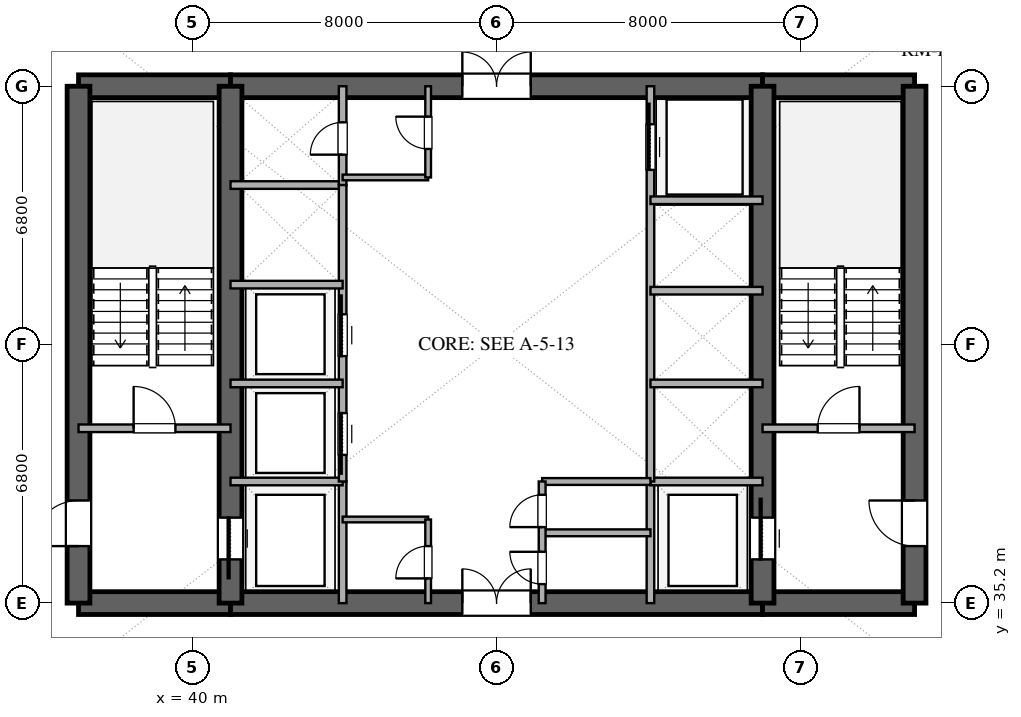
"""IFC4 building model, lengths in metres.
Left out: names, types, materials, properties, quantities, classifications, styles, units other than length and angle.
Written with IfcOpenShell. Run it as: python <this file> out.ifc"""

import sys

from ifc_helpers import new_model, si_unit, direction, frame, frame_2d, origin, place, context, subcontext, project, spatial, rectangle, extrude, element, fill, save


model = new_model("IFC4")
c1 = context("Model", 3, precision=1e-05, world=origin(), true_north=direction((0.0, 1.0)))
c2 = subcontext(c1, "Body", "Model", "MODEL_VIEW")
j1 = project(units=[si_unit("LENGTHUNIT", "METRE"), si_unit("PLANEANGLEUNIT", "RADIAN")], contexts=[c1])
p1 = place(None, origin())
s1 = spatial("IfcSite", under=j1, at=p1, CompositionType="ELEMENT")
p2 = place(p1, origin())
s2 = spatial("IfcBuilding", under=s1, at=p2, CompositionType="ELEMENT")
p3 = place(p2, frame((0.0, 0.0, 67.8)))
s3 = spatial("IfcBuildingStorey", under=s2, at=p3, CompositionType="ELEMENT", Elevation=67.8)
p4 = place(p3, frame((37.0, 35.2, 0.0), z_axis=(0.0, 0.0, 1.0), x_axis=(1.0, 0.0, 0.0)))
e1 = element("IfcWall", 1, at=p4, inside=s3, PredefinedType="SHEAR", context=c2, shape_type="SweptSolid", body=[
    extrude(rectangle(XDim=4.0, YDim=0.6, at=frame_2d((2.0, 0.0))), origin(), (0.0, 0.0, 1.0), 3.38),
])
p5 = place(p3, frame((41.0, 35.2, 0.0), z_axis=(0.0, 0.0, 1.0), x_axis=(1.0, 0.0, 0.0)))
e2 = element("IfcWall", 2, at=p5, inside=s3, PredefinedType="SHEAR", context=c2, shape_type="SweptSolid", body=[
    extrude(rectangle(XDim=14.0, YDim=0.6, at=frame_2d((7.0, 0.0))), origin(), (0.0, 0.0, 1.0), 3.38),
])
p6 = place(p5, frame((6.1, 0.0, 0.0)))
e3 = element("IfcOpeningElement", 3, at=p6, cuts=e2, PredefinedType="OPENING", context=c2, shape_type="SweptSolid", body=[
    extrude(rectangle(XDim=1.8, YDim=2.25, at=frame_2d((0.9, 1.125))), frame((0.0, 0.31, 0.0), z_axis=(0.0, -1.0, 0.0), x_axis=(1.0, 0.0, 0.0)), (0.0, 0.0, 1.0), 0.62),
])
for number, where, z_axis, x_axis in (
    (4, (55.0, 35.2, 0.0), (0.0, 0.0, 1.0), (1.0, 0.0, 0.0)),
    (5, (37.0, 48.8, 0.0), (0.0, 0.0, 1.0), (1.0, 0.0, 0.0)),
):
    element("IfcWall", number, at=place(p3, frame(where, z_axis=z_axis, x_axis=x_axis)), inside=s3, PredefinedType="SHEAR", context=c2, shape_type="SweptSolid", body=[
        extrude(rectangle(XDim=4.0, YDim=0.6, at=frame_2d((2.0, 0.0))), origin(), (0.0, 0.0, 1.0), 3.38),
    ])
p7 = place(p3, frame((41.0, 48.8, 0.0), z_axis=(0.0, 0.0, 1.0), x_axis=(1.0, 0.0, 0.0)))
e6 = element("IfcWall", 6, at=p7, inside=s3, PredefinedType="SHEAR", context=c2, shape_type="SweptSolid", body=[
    extrude(rectangle(XDim=14.0, YDim=0.6, at=frame_2d((7.0, 0.0))), origin(), (0.0, 0.0, 1.0), 3.38),
])
p8 = place(p7, frame((6.1, 0.0, 0.0)))
e7 = element("IfcOpeningElement", 7, at=p8, cuts=e6, PredefinedType="OPENING", context=c2, shape_type="SweptSolid", body=[
    extrude(rectangle(XDim=1.8, YDim=2.25, at=frame_2d((0.9, 1.125))), frame((0.0, 0.31, 0.0), z_axis=(0.0, -1.0, 0.0), x_axis=(1.0, 0.0, 0.0)), (0.0, 0.0, 1.0), 0.62),
])
p9 = place(p3, frame((55.0, 48.8, 0.0), z_axis=(0.0, 0.0, 1.0), x_axis=(1.0, 0.0, 0.0)))
e8 = element("IfcWall", 8, at=p9, inside=s3, PredefinedType="SHEAR", context=c2, shape_type="SweptSolid", body=[
    extrude(rectangle(XDim=4.0, YDim=0.6, at=frame_2d((2.0, 0.0))), origin(), (0.0, 0.0, 1.0), 3.38),
])
p10 = place(p3, frame((37.0, 35.2, 0.0), z_axis=(0.0, 0.0, 1.0), x_axis=(0.0, 1.0, 0.0)))
e9 = element("IfcWall", 9, at=p10, inside=s3, PredefinedType="SHEAR", context=c2, shape_type="SweptSolid", body=[
    extrude(rectangle(XDim=13.6, YDim=0.6, at=frame_2d((6.8, 0.0))), origin(), (0.0, 0.0, 1.0), 3.38),
])
p11 = place(p10, frame((1.5, 0.0, 0.0)))
e10 = element("IfcOpeningElement", 10, at=p11, cuts=e9, PredefinedType="OPENING", context=c2, shape_type="SweptSolid", body=[
    extrude(rectangle(XDim=1.2, YDim=2.15, at=frame_2d((0.6, 1.075))), frame((0.0, 0.31, 0.0), z_axis=(0.0, -1.0, 0.0), x_axis=(1.0, 0.0, 0.0)), (0.0, 0.0, 1.0), 0.62),
])
p12 = place(p3, frame((59.0, 35.2, 0.0), z_axis=(0.0, 0.0, 1.0), x_axis=(0.0, 1.0, 0.0)))
e11 = element("IfcWall", 11, at=p12, inside=s3, PredefinedType="SHEAR", context=c2, shape_type="SweptSolid", body=[
    extrude(rectangle(XDim=13.6, YDim=0.6, at=frame_2d((6.8, 0.0))), origin(), (0.0, 0.0, 1.0), 3.38),
])
p13 = place(p12, frame((1.5, 0.0, 0.0)))
e12 = element("IfcOpeningElement", 12, at=p13, cuts=e11, PredefinedType="OPENING", context=c2, shape_type="SweptSolid", body=[
    extrude(rectangle(XDim=1.2, YDim=2.15, at=frame_2d((0.6, 1.075))), frame((0.0, 0.31, 0.0), z_axis=(0.0, -1.0, 0.0), x_axis=(1.0, 0.0, 0.0)), (0.0, 0.0, 1.0), 0.62),
])
p14 = place(p3, frame((41.0, 35.2, 0.0), z_axis=(0.0, 0.0, 1.0), x_axis=(0.0, 1.0, 0.0)))
e13 = element("IfcWall", 13, at=p14, inside=s3, PredefinedType="SHEAR", context=c2, shape_type="SweptSolid", body=[
    extrude(rectangle(XDim=13.6, YDim=0.6, at=frame_2d((6.8, 0.0))), origin(), (0.0, 0.0, 1.0), 3.38),
])
p15 = place(p14, frame((1.15, 0.0, 0.0)))
e14 = element("IfcOpeningElement", 14, at=p15, cuts=e13, PredefinedType="OPENING", context=c2, shape_type="SweptSolid", body=[
    extrude(rectangle(XDim=1.1, YDim=2.2, at=frame_2d((0.55, 1.1))), frame((0.0, 0.31, 0.0), z_axis=(0.0, -1.0, 0.0), x_axis=(1.0, 0.0, 0.0)), (0.0, 0.0, 1.0), 0.62),
])
p16 = place(p3, frame((55.0, 35.2, 0.0), z_axis=(0.0, 0.0, 1.0), x_axis=(0.0, 1.0, 0.0)))
e15 = element("IfcWall", 15, at=p16, inside=s3, PredefinedType="SHEAR", context=c2, shape_type="SweptSolid", body=[
    extrude(rectangle(XDim=13.6, YDim=0.6, at=frame_2d((6.8, 0.0))), origin(), (0.0, 0.0, 1.0), 3.38),
])
p17 = place(p16, frame((1.15, 0.0, 0.0)))
e16 = element("IfcOpeningElement", 16, at=p17, cuts=e15, PredefinedType="OPENING", context=c2, shape_type="SweptSolid", body=[
    extrude(rectangle(XDim=1.1, YDim=2.2, at=frame_2d((0.55, 1.1))), frame((0.0, 0.31, 0.0), z_axis=(0.0, -1.0, 0.0), x_axis=(1.0, 0.0, 0.0)), (0.0, 0.0, 1.0), 0.62),
])
p18 = place(p3, frame((37.0, 39.8, 0.0), z_axis=(0.0, 0.0, 1.0), x_axis=(1.0, 0.0, 0.0)))
e17 = element("IfcWall", 17, at=p18, inside=s3, PredefinedType="SOLIDWALL", context=c2, shape_type="SweptSolid", body=[
    extrude(rectangle(XDim=4.0, YDim=0.2, at=frame_2d((2.0, 0.0))), origin(), (0.0, 0.0, 1.0), 2.74),
])
p19 = place(p18, frame((1.45, 0.0, 0.0)))
e18 = element("IfcOpeningElement", 18, at=p19, cuts=e17, PredefinedType="OPENING", context=c2, shape_type="SweptSolid", body=[
    extrude(rectangle(XDim=1.1, YDim=2.15, at=frame_2d((0.55, 1.075))), frame((0.0, 0.11, 0.0), z_axis=(0.0, -1.0, 0.0), x_axis=(1.0, 0.0, 0.0)), (0.0, 0.0, 1.0), 0.22),
])
p20 = place(p3, frame((55.0, 39.8, 0.0), z_axis=(0.0, 0.0, 1.0), x_axis=(1.0, 0.0, 0.0)))
e19 = element("IfcWall", 19, at=p20, inside=s3, PredefinedType="SOLIDWALL", context=c2, shape_type="SweptSolid", body=[
    extrude(rectangle(XDim=4.0, YDim=0.2, at=frame_2d((2.0, 0.0))), origin(), (0.0, 0.0, 1.0), 2.74),
])
p21 = place(p20, frame((1.45, 0.0, 0.0)))
e20 = element("IfcOpeningElement", 20, at=p21, cuts=e19, PredefinedType="OPENING", context=c2, shape_type="SweptSolid", body=[
    extrude(rectangle(XDim=1.1, YDim=2.15, at=frame_2d((0.55, 1.075))), frame((0.0, 0.11, 0.0), z_axis=(0.0, -1.0, 0.0), x_axis=(1.0, 0.0, 0.0)), (0.0, 0.0, 1.0), 0.22),
])
p22 = place(p3, frame((43.95, 35.2, 0.0), z_axis=(0.0, 0.0, 1.0), x_axis=(0.0, 1.0, 0.0)))
e21 = element("IfcWall", 21, at=p22, inside=s3, PredefinedType="SOLIDWALL", context=c2, shape_type="SweptSolid", body=[
    extrude(rectangle(XDim=3.2, YDim=0.2, at=frame_2d((1.6, 0.0))), origin(), (0.0, 0.0, 1.0), 2.74),
])
p23 = place(p3, frame((41.0, 38.4, 0.0), z_axis=(0.0, 0.0, 1.0), x_axis=(1.0, 0.0, 0.0)))
e22 = element("IfcWall", 22, at=p23, inside=s3, PredefinedType="SOLIDWALL", context=c2, shape_type="SweptSolid", body=[
    extrude(rectangle(XDim=2.95, YDim=0.2, at=frame_2d((1.475, 0.0))), origin(), (0.0, 0.0, 1.0), 2.74),
])
p24 = place(p3, frame((52.05, 35.2, 0.0), z_axis=(0.0, 0.0, 1.0), x_axis=(0.0, 1.0, 0.0)))
e23 = element("IfcWall", 23, at=p24, inside=s3, PredefinedType="SOLIDWALL", context=c2, shape_type="SweptSolid", body=[
    extrude(rectangle(XDim=3.2, YDim=0.2, at=frame_2d((1.6, 0.0))), origin(), (0.0, 0.0, 1.0), 2.74),
])
for number, where, z_axis, x_axis in (
    (24, (52.05, 38.4, 0.0), (0.0, 0.0, 1.0), (1.0, 0.0, 0.0)),
    (25, (41.0, 46.2, 0.0), (0.0, 0.0, 1.0), (1.0, 0.0, 0.0)),
):
    element("IfcWall", number, at=place(p3, frame(where, z_axis=z_axis, x_axis=x_axis)), inside=s3, PredefinedType="SOLIDWALL", context=c2, shape_type="SweptSolid", body=[
        extrude(rectangle(XDim=2.95, YDim=0.2, at=frame_2d((1.475, 0.0))), origin(), (0.0, 0.0, 1.0), 2.74),
    ])
p25 = place(p3, frame((43.95, 46.2, 0.0), z_axis=(0.0, 0.0, 1.0), x_axis=(0.0, 1.0, 0.0)))
e26 = element("IfcWall", 26, at=p25, inside=s3, PredefinedType="SOLIDWALL", context=c2, shape_type="SweptSolid", body=[
    extrude(rectangle(XDim=2.6, YDim=0.2, at=frame_2d((1.3, 0.0))), origin(), (0.0, 0.0, 1.0), 2.74),
])
p26 = place(p25, frame((0.8, 0.0, 0.0)))
e27 = element("IfcOpeningElement", 27, at=p26, cuts=e26, PredefinedType="OPENING", context=c2, shape_type="SweptSolid", body=[
    extrude(rectangle(XDim=0.85, YDim=2.15, at=frame_2d((0.425, 1.075))), frame((0.0, 0.11, 0.0), z_axis=(0.0, -1.0, 0.0), x_axis=(1.0, 0.0, 0.0)), (0.0, 0.0, 1.0), 0.22),
])
p27 = place(p3, frame((43.95, 38.4, 0.0), z_axis=(0.0, 0.0, 1.0), x_axis=(0.0, 1.0, 0.0)))
e28 = element("IfcWall", 28, at=p27, inside=s3, PredefinedType="SOLIDWALL", context=c2, shape_type="SweptSolid", body=[
    extrude(rectangle(XDim=7.8, YDim=0.2, at=frame_2d((3.9, 0.0))), origin(), (0.0, 0.0, 1.0), 2.74),
])
p28 = place(p27, frame((0.7, 0.0, 0.0)))
e29 = element("IfcOpeningElement", 29, at=p28, cuts=e28, PredefinedType="OPENING", context=c2, shape_type="SweptSolid", body=[
    extrude(rectangle(XDim=1.1, YDim=2.2, at=frame_2d((0.55, 1.1))), frame((0.0, 0.11, 0.0), z_axis=(0.0, -1.0, 0.0), x_axis=(1.0, 0.0, 0.0)), (0.0, 0.0, 1.0), 0.22),
])
p29 = place(p27, frame((3.3, 0.0, 0.0)))
e30 = element("IfcOpeningElement", 30, at=p29, cuts=e28, PredefinedType="OPENING", context=c2, shape_type="SweptSolid", body=[
    extrude(rectangle(XDim=1.1, YDim=2.2, at=frame_2d((0.55, 1.1))), frame((0.0, 0.11, 0.0), z_axis=(0.0, -1.0, 0.0), x_axis=(1.0, 0.0, 0.0)), (0.0, 0.0, 1.0), 0.22),
])
for number, where, z_axis, x_axis in (
    (31, (41.0, 40.98, 0.0), (0.0, 0.0, 1.0), (1.0, 0.0, 0.0)),
    (32, (41.0, 43.58, 0.0), (0.0, 0.0, 1.0), (1.0, 0.0, 0.0)),
):
    element("IfcWall", number, at=place(p3, frame(where, z_axis=z_axis, x_axis=x_axis)), inside=s3, PredefinedType="SOLIDWALL", context=c2, shape_type="SweptSolid", body=[
        extrude(rectangle(XDim=2.95, YDim=0.2, at=frame_2d((1.475, 0.0))), origin(), (0.0, 0.0, 1.0), 2.74),
    ])
p30 = place(p3, frame((52.05, 38.4, 0.0), z_axis=(0.0, 0.0, 1.0), x_axis=(0.0, 1.0, 0.0)))
e33 = element("IfcWall", 33, at=p30, inside=s3, PredefinedType="SOLIDWALL", context=c2, shape_type="SweptSolid", body=[
    extrude(rectangle(XDim=10.4, YDim=0.2, at=frame_2d((5.2, 0.0))), origin(), (0.0, 0.0, 1.0), 2.74),
])
p31 = place(p30, frame((8.2, 0.0, 0.0)))
e34 = element("IfcOpeningElement", 34, at=p31, cuts=e33, PredefinedType="OPENING", context=c2, shape_type="SweptSolid", body=[
    extrude(rectangle(XDim=1.2, YDim=2.2, at=frame_2d((0.6, 1.1))), frame((0.0, 0.11, 0.0), z_axis=(0.0, -1.0, 0.0), x_axis=(1.0, 0.0, 0.0)), (0.0, 0.0, 1.0), 0.22),
])
for number, where, z_axis, x_axis in (
    (35, (52.05, 40.98, 0.0), (0.0, 0.0, 1.0), (1.0, 0.0, 0.0)),
    (36, (52.05, 43.42, 0.0), (0.0, 0.0, 1.0), (1.0, 0.0, 0.0)),
    (37, (52.05, 45.8, 0.0), (0.0, 0.0, 1.0), (1.0, 0.0, 0.0)),
):
    element("IfcWall", number, at=place(p3, frame(where, z_axis=z_axis, x_axis=x_axis)), inside=s3, PredefinedType="SOLIDWALL", context=c2, shape_type="SweptSolid", body=[
        extrude(rectangle(XDim=2.95, YDim=0.2, at=frame_2d((1.475, 0.0))), origin(), (0.0, 0.0, 1.0), 2.74),
    ])
p32 = place(p3, frame((43.95, 37.4, 0.0), z_axis=(0.0, 0.0, 1.0), x_axis=(1.0, 0.0, 0.0)))
e38 = element("IfcWall", 38, at=p32, inside=s3, PredefinedType="PARTITIONING", context=c2, shape_type="SweptSolid", body=[
    extrude(rectangle(XDim=2.25, YDim=0.15, at=frame_2d((1.125, 0.0))), origin(), (0.0, 0.0, 1.0), 2.74),
])
p33 = place(p3, frame((46.2, 35.2, 0.0), z_axis=(0.0, 0.0, 1.0), x_axis=(0.0, 1.0, 0.0)))
e39 = element("IfcWall", 39, at=p33, inside=s3, PredefinedType="PARTITIONING", context=c2, shape_type="SweptSolid", body=[
    extrude(rectangle(XDim=2.2, YDim=0.15, at=frame_2d((1.1, 0.0))), origin(), (0.0, 0.0, 1.0), 2.74),
])
p34 = place(p33, frame((0.65, 0.0, 0.0)))
e40 = element("IfcOpeningElement", 40, at=p34, cuts=e39, PredefinedType="OPENING", context=c2, shape_type="SweptSolid", body=[
    extrude(rectangle(XDim=0.85, YDim=2.15, at=frame_2d((0.425, 1.075))), frame((0.0, 0.085, 0.0), z_axis=(0.0, -1.0, 0.0), x_axis=(1.0, 0.0, 0.0)), (0.0, 0.0, 1.0), 0.17),
])
p35 = place(p3, frame((43.95, 46.4, 0.0), z_axis=(0.0, 0.0, 1.0), x_axis=(1.0, 0.0, 0.0)))
e41 = element("IfcWall", 41, at=p35, inside=s3, PredefinedType="PARTITIONING", context=c2, shape_type="SweptSolid", body=[
    extrude(rectangle(XDim=2.25, YDim=0.15, at=frame_2d((1.125, 0.0))), origin(), (0.0, 0.0, 1.0), 2.74),
])
p36 = place(p3, frame((46.2, 46.4, 0.0), z_axis=(0.0, 0.0, 1.0), x_axis=(0.0, 1.0, 0.0)))
e42 = element("IfcWall", 42, at=p36, inside=s3, PredefinedType="PARTITIONING", context=c2, shape_type="SweptSolid", body=[
    extrude(rectangle(XDim=2.4, YDim=0.15, at=frame_2d((1.2, 0.0))), origin(), (0.0, 0.0, 1.0), 2.74),
])
p37 = place(p36, frame((0.75, 0.0, 0.0)))
e43 = element("IfcOpeningElement", 43, at=p37, cuts=e42, PredefinedType="OPENING", context=c2, shape_type="SweptSolid", body=[
    extrude(rectangle(XDim=0.85, YDim=2.15, at=frame_2d((0.425, 1.075))), frame((0.0, 0.085, 0.0), z_axis=(0.0, -1.0, 0.0), x_axis=(1.0, 0.0, 0.0)), (0.0, 0.0, 1.0), 0.17),
])
for number, where, z_axis, x_axis in (
    (44, (49.2, 37.05, 0.0), (0.0, 0.0, 1.0), (1.0, 0.0, 0.0)),
    (45, (49.2, 38.4, 0.0), (0.0, 0.0, 1.0), (1.0, 0.0, 0.0)),
):
    element("IfcWall", number, at=place(p3, frame(where, z_axis=z_axis, x_axis=x_axis)), inside=s3, PredefinedType="PLUMBINGWALL", context=c2, shape_type="SweptSolid", body=[
        extrude(rectangle(XDim=2.85, YDim=0.18, at=frame_2d((1.425, 0.0))), origin(), (0.0, 0.0, 1.0), 2.74),
    ])
p38 = place(p3, frame((49.2, 35.2, 0.0), z_axis=(0.0, 0.0, 1.0), x_axis=(0.0, 1.0, 0.0)))
e46 = element("IfcWall", 46, at=p38, inside=s3, PredefinedType="PLUMBINGWALL", context=c2, shape_type="SweptSolid", body=[
    extrude(rectangle(XDim=3.2, YDim=0.18, at=frame_2d((1.6, 0.0))), origin(), (0.0, 0.0, 1.0), 2.74),
])
p39 = place(p38, frame((0.5, 0.0, 0.0)))
e47 = element("IfcOpeningElement", 47, at=p39, cuts=e46, PredefinedType="OPENING", context=c2, shape_type="SweptSolid", body=[
    extrude(rectangle(XDim=0.85, YDim=2.1, at=frame_2d((0.425, 1.05))), frame((0.0, 0.1, 0.0), z_axis=(0.0, -1.0, 0.0), x_axis=(1.0, 0.0, 0.0)), (0.0, 0.0, 1.0), 0.2),
])
p40 = place(p38, frame((2.0, 0.0, 0.0)))
e48 = element("IfcOpeningElement", 48, at=p40, cuts=e46, PredefinedType="OPENING", context=c2, shape_type="SweptSolid", body=[
    extrude(rectangle(XDim=0.85, YDim=2.15, at=frame_2d((0.425, 1.075))), frame((0.0, 0.1, 0.0), z_axis=(0.0, -1.0, 0.0), x_axis=(1.0, 0.0, 0.0)), (0.0, 0.0, 1.0), 0.2),
])
p41 = place(p15, origin())
e49 = element("IfcDoor", 49, at=p41, inside=s3, OperationType="SLIDING_TO_LEFT", PredefinedType="DOOR", context=c2, shape_type="SweptSolid", body=[
    extrude(rectangle(XDim=1.1, YDim=2.2, at=frame_2d((0.55, 1.1))), frame((0.0, 0.025, 0.0), z_axis=(0.0, -1.0, 0.0), x_axis=(1.0, 0.0, 0.0)), (0.0, 0.0, 1.0), 0.05),
])
fill(e14, e49)
p42 = place(p17, origin())
e50 = element("IfcDoor", 50, at=p42, inside=s3, OperationType="SLIDING_TO_RIGHT", PredefinedType="DOOR", context=c2, shape_type="SweptSolid", body=[
    extrude(rectangle(XDim=1.1, YDim=2.2, at=frame_2d((0.55, 1.1))), frame((0.0, 0.025, 0.0), z_axis=(0.0, -1.0, 0.0), x_axis=(1.0, 0.0, 0.0)), (0.0, 0.0, 1.0), 0.05),
])
fill(e16, e50)
p43 = place(p11, origin())
e51 = element("IfcDoor", 51, at=p43, inside=s3, OperationType="SINGLE_SWING_LEFT", PredefinedType="DOOR", context=c2, shape_type="SweptSolid", body=[
    extrude(rectangle(XDim=1.2, YDim=2.15, at=frame_2d((0.6, 1.075))), frame((0.0, 0.025, 0.0), z_axis=(0.0, -1.0, 0.0), x_axis=(1.0, 0.0, 0.0)), (0.0, 0.0, 1.0), 0.05),
])
fill(e10, e51)
p44 = place(p13, origin())
e52 = element("IfcDoor", 52, at=p44, inside=s3, OperationType="SINGLE_SWING_RIGHT", PredefinedType="DOOR", context=c2, shape_type="SweptSolid", body=[
    extrude(rectangle(XDim=1.2, YDim=2.15, at=frame_2d((0.6, 1.075))), frame((0.0, 0.025, 0.0), z_axis=(0.0, -1.0, 0.0), x_axis=(1.0, 0.0, 0.0)), (0.0, 0.0, 1.0), 0.05),
])
fill(e12, e52)
p45 = place(p6, origin())
e53 = element("IfcDoor", 53, at=p45, inside=s3, OperationType="DOUBLE_DOOR_SINGLE_SWING", PredefinedType="DOOR", context=c2, shape_type="SweptSolid", body=[
    extrude(rectangle(XDim=1.8, YDim=2.25, at=frame_2d((0.9, 1.125))), frame((0.0, 0.025, 0.0), z_axis=(0.0, -1.0, 0.0), x_axis=(1.0, 0.0, 0.0)), (0.0, 0.0, 1.0), 0.05),
])
fill(e3, e53)
p46 = place(p8, origin())
e54 = element("IfcDoor", 54, at=p46, inside=s3, OperationType="DOUBLE_DOOR_SINGLE_SWING", PredefinedType="DOOR", context=c2, shape_type="SweptSolid", body=[
    extrude(rectangle(XDim=1.8, YDim=2.25, at=frame_2d((0.9, 1.125))), frame((0.0, 0.025, 0.0), z_axis=(0.0, -1.0, 0.0), x_axis=(1.0, 0.0, 0.0)), (0.0, 0.0, 1.0), 0.05),
])
fill(e7, e54)
p47 = place(p19, origin())
e55 = element("IfcDoor", 55, at=p47, inside=s3, OperationType="SINGLE_SWING_LEFT", PredefinedType="DOOR", context=c2, shape_type="SweptSolid", body=[
    extrude(rectangle(XDim=1.1, YDim=2.15, at=frame_2d((0.55, 1.075))), frame((0.0, 0.025, 0.0), z_axis=(0.0, -1.0, 0.0), x_axis=(1.0, 0.0, 0.0)), (0.0, 0.0, 1.0), 0.05),
])
fill(e18, e55)
p48 = place(p21, origin())
e56 = element("IfcDoor", 56, at=p48, inside=s3, OperationType="SINGLE_SWING_RIGHT", PredefinedType="DOOR", context=c2, shape_type="SweptSolid", body=[
    extrude(rectangle(XDim=1.1, YDim=2.15, at=frame_2d((0.55, 1.075))), frame((0.0, 0.025, 0.0), z_axis=(0.0, -1.0, 0.0), x_axis=(1.0, 0.0, 0.0)), (0.0, 0.0, 1.0), 0.05),
])
fill(e20, e56)
p49 = place(p26, origin())
e57 = element("IfcDoor", 57, at=p49, inside=s3, OperationType="SINGLE_SWING_LEFT", PredefinedType="DOOR", context=c2, shape_type="SweptSolid", body=[
    extrude(rectangle(XDim=0.85, YDim=2.15, at=frame_2d((0.425, 1.075))), frame((0.0, 0.025, 0.0), z_axis=(0.0, -1.0, 0.0), x_axis=(1.0, 0.0, 0.0)), (0.0, 0.0, 1.0), 0.05),
])
fill(e27, e57)
p50 = place(p28, origin())
e58 = element("IfcDoor", 58, at=p50, inside=s3, OperationType="SLIDING_TO_LEFT", PredefinedType="DOOR", context=c2, shape_type="SweptSolid", body=[
    extrude(rectangle(XDim=1.1, YDim=2.2, at=frame_2d((0.55, 1.1))), frame((0.0, 0.025, 0.0), z_axis=(0.0, -1.0, 0.0), x_axis=(1.0, 0.0, 0.0)), (0.0, 0.0, 1.0), 0.05),
])
fill(e29, e58)
p51 = place(p29, origin())
e59 = element("IfcDoor", 59, at=p51, inside=s3, OperationType="SLIDING_TO_RIGHT", PredefinedType="DOOR", context=c2, shape_type="SweptSolid", body=[
    extrude(rectangle(XDim=1.1, YDim=2.2, at=frame_2d((0.55, 1.1))), frame((0.0, 0.025, 0.0), z_axis=(0.0, -1.0, 0.0), x_axis=(1.0, 0.0, 0.0)), (0.0, 0.0, 1.0), 0.05),
])
fill(e30, e59)
p52 = place(p31, origin())
e60 = element("IfcDoor", 60, at=p52, inside=s3, OperationType="SLIDING_TO_RIGHT", PredefinedType="DOOR", context=c2, shape_type="SweptSolid", body=[
    extrude(rectangle(XDim=1.2, YDim=2.2, at=frame_2d((0.6, 1.1))), frame((0.0, 0.025, 0.0), z_axis=(0.0, -1.0, 0.0), x_axis=(1.0, 0.0, 0.0)), (0.0, 0.0, 1.0), 0.05),
])
fill(e34, e60)
p53 = place(p34, origin())
e61 = element("IfcDoor", 61, at=p53, inside=s3, OperationType="SINGLE_SWING_LEFT", PredefinedType="DOOR", context=c2, shape_type="SweptSolid", body=[
    extrude(rectangle(XDim=0.85, YDim=2.15, at=frame_2d((0.425, 1.075))), frame((0.0, 0.025, 0.0), z_axis=(0.0, -1.0, 0.0), x_axis=(1.0, 0.0, 0.0)), (0.0, 0.0, 1.0), 0.05),
])
fill(e40, e61)
p54 = place(p37, origin())
e62 = element("IfcDoor", 62, at=p54, inside=s3, OperationType="SINGLE_SWING_RIGHT", PredefinedType="DOOR", context=c2, shape_type="SweptSolid", body=[
    extrude(rectangle(XDim=0.85, YDim=2.15, at=frame_2d((0.425, 1.075))), frame((0.0, 0.025, 0.0), z_axis=(0.0, -1.0, 0.0), x_axis=(1.0, 0.0, 0.0)), (0.0, 0.0, 1.0), 0.05),
])
fill(e43, e62)
p55 = place(p39, origin())
e63 = element("IfcDoor", 63, at=p55, inside=s3, OperationType="SINGLE_SWING_RIGHT", PredefinedType="DOOR", context=c2, shape_type="SweptSolid", body=[
    extrude(rectangle(XDim=0.85, YDim=2.1, at=frame_2d((0.425, 1.05))), frame((0.0, 0.025, 0.0), z_axis=(0.0, -1.0, 0.0), x_axis=(1.0, 0.0, 0.0)), (0.0, 0.0, 1.0), 0.05),
])
fill(e47, e63)
p56 = place(p40, origin())
e64 = element("IfcDoor", 64, at=p56, inside=s3, OperationType="SINGLE_SWING_LEFT", PredefinedType="DOOR", context=c2, shape_type="SweptSolid", body=[
    extrude(rectangle(XDim=0.85, YDim=2.15, at=frame_2d((0.425, 1.075))), frame((0.0, 0.025, 0.0), z_axis=(0.0, -1.0, 0.0), x_axis=(1.0, 0.0, 0.0)), (0.0, 0.0, 1.0), 0.05),
])
fill(e48, e64)
save(model, sys.argv[1])
